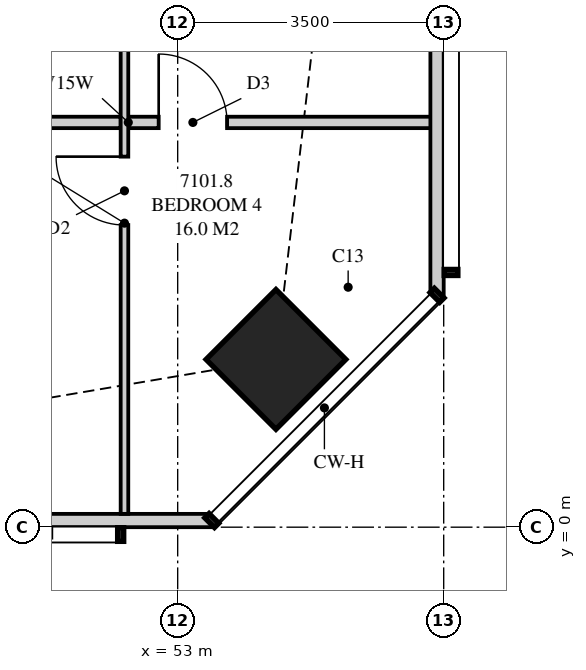
"""IFC4 building model, lengths in metres.
Left out: names, types, materials, properties, quantities, classifications, styles, units other than length and angle.
Written with IfcOpenShell. Run it as: python <this file> out.ifc"""

import sys

from ifc_helpers import new_model, si_unit, direction, frame, frame_2d, origin, origin_2d, place, context, subcontext, project, spatial, polyline, rectangle, outline, extrude, element, fill, save


model = new_model("IFC4")
c1 = context("Model", 3, precision=1e-05, world=origin(), true_north=direction((0.0, 1.0)))
c2 = subcontext(c1, "Body", "Model", "MODEL_VIEW")
j1 = project(units=[si_unit("LENGTHUNIT", "METRE"), si_unit("PLANEANGLEUNIT", "RADIAN")], contexts=[c1])
p1 = place(None, origin())
s1 = spatial("IfcSite", under=j1, at=p1, CompositionType="ELEMENT")
p2 = place(p1, origin())
s2 = spatial("IfcBuilding", under=s1, at=p2, CompositionType="ELEMENT")
p3 = place(p2, frame((0.0, 0.0, 259.95)))
s3 = spatial("IfcBuildingStorey", under=s2, at=p3, CompositionType="ELEMENT", Elevation=259.95)
p4 = place(p3, frame((54.293, 2.207, 0.0), z_axis=(0.0, 0.0, 1.0), x_axis=(0.707106781187, 0.707106781187, 0.0)))
e1 = element("IfcColumn", 1, at=p4, inside=s3, PredefinedType="COLUMN", context=c2, shape_type="SweptSolid", body=[
    extrude(rectangle(XDim=1.3, YDim=1.3, at=origin_2d()), origin(), (0.0, 0.0, 1.0), 3.9),
])
p5 = place(p3, frame((40.95, 0.087, 0.0), z_axis=(0.0, 0.0, 1.0), x_axis=(1.0, 0.0, 0.0)))
e2 = element("IfcWall", 2, at=p5, inside=s3, PredefinedType="SOLIDWALL", context=c2, shape_type="SweptSolid", body=[
    extrude(outline(polyline([(0.0, 0.0), (12.499, 0.0), (12.499, 3.66), (6.14, 3.66), (6.14, 2.7), (6.056, 2.7), (6.056, 3.66), (5.925, 3.66), (5.925, 2.7), (0.0, 2.7), (0.0, 0.0)])), frame((0.0, 0.087, 0.0), z_axis=(0.0, -1.0, 0.0), x_axis=(1.0, 0.0, 0.0)), (0.0, 0.0, 1.0), 0.175),
])
p6 = place(p5, frame((0.761, 0.0, 0.4)))
e3 = element("IfcOpeningElement", 3, at=p6, cuts=e2, PredefinedType="OPENING", context=c2, shape_type="SweptSolid", body=[
    extrude(rectangle(XDim=1.2, YDim=2.0, at=frame_2d((0.6, 1.0))), frame((0.0, 0.097, 0.0), z_axis=(0.0, -1.0, 0.0), x_axis=(1.0, 0.0, 0.0)), (0.0, 0.0, 1.0), 0.195),
])
p7 = place(p5, frame((2.944, 0.0, 0.4)))
e4 = element("IfcOpeningElement", 4, at=p7, cuts=e2, PredefinedType="OPENING", context=c2, shape_type="SweptSolid", body=[
    extrude(rectangle(XDim=2.1, YDim=2.25, at=frame_2d((1.05, 1.125))), frame((0.0, 0.097, 0.0), z_axis=(0.0, -1.0, 0.0), x_axis=(1.0, 0.0, 0.0)), (0.0, 0.0, 1.0), 0.195),
])
p8 = place(p5, frame((8.2, 0.0, 0.4)))
e5 = element("IfcOpeningElement", 5, at=p8, cuts=e2, PredefinedType="OPENING", context=c2, shape_type="SweptSolid", body=[
    extrude(rectangle(XDim=2.1, YDim=2.25, at=frame_2d((1.05, 1.125))), frame((0.0, 0.097, 0.0), z_axis=(0.0, -1.0, 0.0), x_axis=(1.0, 0.0, 0.0)), (0.0, 0.0, 1.0), 0.195),
])
p9 = place(p3, frame((56.413, 3.051, 0.0), z_axis=(0.0, 0.0, 1.0), x_axis=(0.0, 1.0, 0.0)))
e6 = element("IfcWall", 6, at=p9, inside=s3, PredefinedType="SOLIDWALL", context=c2, shape_type="SweptSolid", body=[
    extrude(outline(polyline([(0.0, 0.0), (17.524, 0.0), (17.524, 2.7), (9.949, 2.7), (9.949, 3.66), (9.858, 3.66), (9.858, 2.7), (9.688, 2.7), (9.688, 3.66), (0.0, 3.66), (0.0, 0.0)])), frame((0.0, 0.087, 0.0), z_axis=(0.0, -1.0, 0.0), x_axis=(1.0, 0.0, 0.0)), (0.0, 0.0, 1.0), 0.175),
])
p10 = place(p9, frame((5.924, 0.0, 0.4)))
e7 = element("IfcOpeningElement", 7, at=p10, cuts=e6, PredefinedType="OPENING", context=c2, shape_type="SweptSolid", body=[
    extrude(rectangle(XDim=2.1, YDim=2.25, at=frame_2d((1.05, 1.125))), frame((0.0, 0.097, 0.0), z_axis=(0.0, -1.0, 0.0), x_axis=(1.0, 0.0, 0.0)), (0.0, 0.0, 1.0), 0.195),
])
p11 = place(p9, frame((10.804, 0.0, 0.4)))
e8 = element("IfcOpeningElement", 8, at=p11, cuts=e6, PredefinedType="OPENING", context=c2, shape_type="SweptSolid", body=[
    extrude(rectangle(XDim=2.1, YDim=2.25, at=frame_2d((1.05, 1.125))), frame((0.0, 0.097, 0.0), z_axis=(0.0, -1.0, 0.0), x_axis=(1.0, 0.0, 0.0)), (0.0, 0.0, 1.0), 0.195),
])
p12 = place(p9, frame((14.374, 0.0, 0.4)))
e9 = element("IfcOpeningElement", 9, at=p12, cuts=e6, PredefinedType="OPENING", context=c2, shape_type="SweptSolid", body=[
    extrude(rectangle(XDim=2.1, YDim=2.25, at=frame_2d((1.05, 1.125))), frame((0.0, 0.097, 0.0), z_axis=(0.0, -1.0, 0.0), x_axis=(1.0, 0.0, 0.0)), (0.0, 0.0, 1.0), 0.195),
])
p13 = place(p3, frame((52.3, 0.175, 0.0), z_axis=(0.0, 0.0, 1.0), x_axis=(0.0, 1.0, 0.0)))
e10 = element("IfcWall", 10, at=p13, inside=s3, PredefinedType="PARTITIONING", context=c2, shape_type="SweptSolid", body=[
    extrude(outline(polyline([(0.0, 0.0), (7.65, 0.0), (7.65, 3.66), (2.567, 3.66), (2.567, 2.7), (0.822, 2.7), (0.822, 3.66), (0.0, 3.66), (0.0, 0.0)])), frame((0.0, 0.05, 0.0), z_axis=(0.0, -1.0, 0.0), x_axis=(1.0, 0.0, 0.0)), (0.0, 0.0, 1.0), 0.1),
])
p14 = place(p13, frame((3.8, 0.0, 0.0)))
e11 = element("IfcOpeningElement", 11, at=p14, cuts=e10, PredefinedType="OPENING", context=c2, shape_type="SweptSolid", body=[
    extrude(rectangle(XDim=0.9, YDim=2.1, at=frame_2d((0.45, 1.05))), frame((0.0, 0.06, 0.0), z_axis=(0.0, -1.0, 0.0), x_axis=(1.0, 0.0, 0.0)), (0.0, 0.0, 1.0), 0.12),
])
p15 = place(p3, frame((48.15, 5.325, 0.0), z_axis=(0.0, 0.0, 1.0), x_axis=(1.0, 0.0, 0.0)))
e12 = element("IfcWall", 12, at=p15, inside=s3, PredefinedType="PLUMBINGWALL", context=c2, shape_type="SweptSolid", body=[
    extrude(outline(polyline([(0.0, 0.0), (4.1, 0.0), (4.1, 3.66), (0.01, 3.66), (0.01, 3.06), (0.0, 3.06), (0.0, 3.66), (0.0, 0.0)])), frame((0.0, 0.075, 0.0), z_axis=(0.0, -1.0, 0.0), x_axis=(1.0, 0.0, 0.0)), (0.0, 0.0, 1.0), 0.15),
])
p16 = place(p15, frame((0.4, 0.0, 0.0)))
e13 = element("IfcOpeningElement", 13, at=p16, cuts=e12, PredefinedType="OPENING", context=c2, shape_type="SweptSolid", body=[
    extrude(rectangle(XDim=0.9, YDim=2.1, at=frame_2d((0.45, 1.05))), frame((0.0, 0.085, 0.0), z_axis=(0.0, -1.0, 0.0), x_axis=(1.0, 0.0, 0.0)), (0.0, 0.0, 1.0), 0.17),
])
p17 = place(p3, frame((52.35, 5.325, 0.0), z_axis=(0.0, 0.0, 1.0), x_axis=(1.0, 0.0, 0.0)))
e14 = element("IfcWall", 14, at=p17, inside=s3, PredefinedType="PLUMBINGWALL", context=c2, shape_type="SweptSolid", body=[
    extrude(outline(polyline([(0.0, 0.0), (4.15, 0.0), (4.15, 3.66), (3.197, 3.66), (3.197, 2.7), (1.415, 2.7), (1.415, 3.66), (0.0, 3.66), (0.0, 0.0)])), frame((0.0, 0.075, 0.0), z_axis=(0.0, -1.0, 0.0), x_axis=(1.0, 0.0, 0.0)), (0.0, 0.0, 1.0), 0.15),
])
p18 = place(p17, frame((0.4, 0.0, 0.0)))
e15 = element("IfcOpeningElement", 15, at=p18, cuts=e14, PredefinedType="OPENING", context=c2, shape_type="SweptSolid", body=[
    extrude(rectangle(XDim=0.9, YDim=2.1, at=frame_2d((0.45, 1.05))), frame((0.0, 0.085, 0.0), z_axis=(0.0, -1.0, 0.0), x_axis=(1.0, 0.0, 0.0)), (0.0, 0.0, 1.0), 0.17),
])
p19 = place(p14, origin())
e16 = element("IfcDoor", 16, at=p19, inside=s3, OperationType="SINGLE_SWING_RIGHT", PredefinedType="DOOR", context=c2, shape_type="SweptSolid", body=[
    extrude(rectangle(XDim=0.9, YDim=2.1, at=frame_2d((0.45, 1.05))), frame((0.0, 0.025, 0.0), z_axis=(0.0, -1.0, 0.0), x_axis=(1.0, 0.0, 0.0)), (0.0, 0.0, 1.0), 0.05),
])
fill(e11, e16)
p20 = place(p18, origin())
e17 = element("IfcDoor", 17, at=p20, inside=s3, OperationType="SINGLE_SWING_LEFT", PredefinedType="DOOR", context=c2, shape_type="SweptSolid", body=[
    extrude(rectangle(XDim=0.9, YDim=2.1, at=frame_2d((0.45, 1.05))), frame((0.0, 0.025, 0.0), z_axis=(0.0, -1.0, 0.0), x_axis=(1.0, 0.0, 0.0)), (0.0, 0.0, 1.0), 0.05),
])
fill(e15, e17)
save(model, sys.argv[1])
